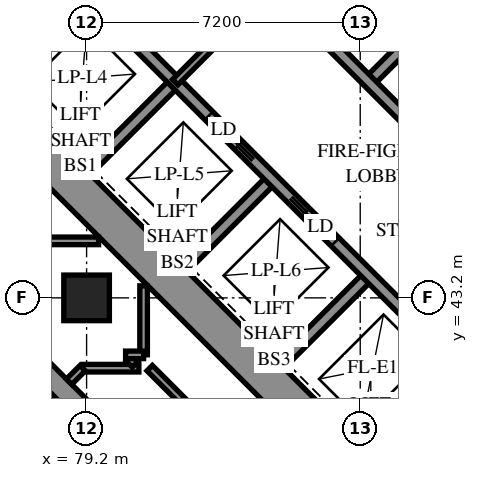
"""IFC4 building model, lengths in metres.
Left out: names, types, materials, properties, quantities, classifications, styles, units other than length and angle.
Written with IfcOpenShell. Run it as: python <this file> out.ifc"""

import sys

from ifc_helpers import new_model, si_unit, direction, frame, frame_2d, origin, origin_2d, place, context, subcontext, project, spatial, polyline, rectangle, outline, extrude, element, fill, save


model = new_model("IFC4")
c1 = context("Model", 3, precision=1e-05, world=origin(), true_north=direction((0.0, 1.0)))
c2 = subcontext(c1, "Body", "Model", "MODEL_VIEW")
j1 = project(units=[si_unit("LENGTHUNIT", "METRE"), si_unit("PLANEANGLEUNIT", "RADIAN")], contexts=[c1])
p1 = place(None, origin())
s1 = spatial("IfcSite", under=j1, at=p1, CompositionType="ELEMENT")
p2 = place(p1, origin())
s2 = spatial("IfcBuilding", under=s1, at=p2, CompositionType="ELEMENT")
p3 = place(p2, frame((0.0, 0.0, 18.6)))
s3 = spatial("IfcBuildingStorey", under=s2, at=p3, CompositionType="ELEMENT", Elevation=18.6)
p4 = place(p3, frame((79.2, 43.2, 0.0), z_axis=(0.0, 0.0, 1.0), x_axis=(1.0, 0.0, 0.0)))
e1 = element("IfcColumn", 1, at=p4, inside=s3, PredefinedType="COLUMN", context=c2, shape_type="SweptSolid", body=[
    extrude(rectangle(XDim=1.2, YDim=1.2, at=origin_2d()), origin(), (0.0, 0.0, 1.0), 3.8),
])
p5 = place(p3, frame((75.594, 49.443, -0.4), z_axis=(0.0, 0.0, 1.0), x_axis=(0.7071037324, -0.70710983, 0.0)))
e2 = element("IfcWall", 2, at=p5, inside=s3, PredefinedType="SHEAR", context=c2, shape_type="SweptSolid", body=[
    extrude(rectangle(XDim=16.4, YDim=1.0, at=frame_2d((8.2, 0.0))), origin(), (0.0, 0.0, 1.0), 3.5),
])
p6 = place(p3, frame((86.483, 60.333, -0.4), z_axis=(0.0, 0.0, 1.0), x_axis=(0.70710983, -0.7071037324, 0.0)))
e3 = element("IfcWall", 3, at=p6, inside=s3, PredefinedType="SHEAR", context=c2, shape_type="SweptSolid", body=[
    extrude(rectangle(XDim=16.4, YDim=1.0, at=frame_2d((8.2, 0.0))), origin(), (0.0, 0.0, 1.0), 3.5),
])
p7 = place(p6, frame((11.0, 0.0, 0.4)))
e4 = element("IfcOpeningElement", 4, at=p7, cuts=e3, PredefinedType="OPENING", context=c2, shape_type="SweptSolid", body=[
    extrude(rectangle(XDim=0.8, YDim=2.1, at=frame_2d((0.4, 1.05))), frame((0.0, 0.51, 0.0), z_axis=(0.0, -1.0, 0.0), x_axis=(1.0, 0.0, 0.0)), (0.0, 0.0, 1.0), 1.02),
])
p8 = place(p3, frame((76.301, 49.443, -0.4), z_axis=(0.0, 0.0, 1.0), x_axis=(0.7071067812, 0.7071067812, 0.0)))
e5 = element("IfcWall", 5, at=p8, inside=s3, PredefinedType="SHEAR", context=c2, shape_type="SweptSolid", body=[
    extrude(rectangle(XDim=14.4, YDim=1.0, at=frame_2d((7.2, 0.0))), origin(), (0.0, 0.0, 1.0), 3.5),
])
p9 = place(p8, frame((4.55, 0.0, 0.4)))
e6 = element("IfcOpeningElement", 6, at=p9, cuts=e5, PredefinedType="OPENING", context=c2, shape_type="SweptSolid", body=[
    extrude(rectangle(XDim=1.1, YDim=2.1, at=frame_2d((0.55, 1.05))), frame((0.0, 0.51, 0.0), z_axis=(0.0, -1.0, 0.0), x_axis=(1.0, 0.0, 0.0)), (0.0, 0.0, 1.0), 1.02),
])
p10 = place(p8, frame((11.35, 0.0, 0.4)))
e7 = element("IfcOpeningElement", 7, at=p10, cuts=e5, PredefinedType="OPENING", context=c2, shape_type="SweptSolid", body=[
    extrude(rectangle(XDim=1.1, YDim=2.1, at=frame_2d((0.55, 1.05))), frame((0.0, 0.51, 0.0), z_axis=(0.0, -1.0, 0.0), x_axis=(1.0, 0.0, 0.0)), (0.0, 0.0, 1.0), 1.02),
])
p11 = place(p3, frame((87.19, 38.554, -0.4), z_axis=(0.0, 0.0, 1.0), x_axis=(0.707103309, 0.7071102534, 0.0)))
e8 = element("IfcWall", 8, at=p11, inside=s3, PredefinedType="SHEAR", context=c2, shape_type="SweptSolid", body=[
    extrude(rectangle(XDim=14.4, YDim=1.0, at=frame_2d((7.2, 0.0))), origin(), (0.0, 0.0, 1.0), 3.5),
])
p12 = place(p11, frame((4.55, 0.0, 0.4)))
e9 = element("IfcOpeningElement", 9, at=p12, cuts=e8, PredefinedType="OPENING", context=c2, shape_type="SweptSolid", body=[
    extrude(rectangle(XDim=1.1, YDim=2.1, at=frame_2d((0.55, 1.05))), frame((0.0, 0.51, 0.0), z_axis=(0.0, -1.0, 0.0), x_axis=(1.0, 0.0, 0.0)), (0.0, 0.0, 1.0), 1.02),
])
p13 = place(p11, frame((11.35, 0.0, 0.4)))
e10 = element("IfcOpeningElement", 10, at=p13, cuts=e8, PredefinedType="OPENING", context=c2, shape_type="SweptSolid", body=[
    extrude(rectangle(XDim=1.1, YDim=2.1, at=frame_2d((0.55, 1.05))), frame((0.0, 0.51, 0.0), z_axis=(0.0, -1.0, 0.0), x_axis=(1.0, 0.0, 0.0)), (0.0, 0.0, 1.0), 1.02),
])
p14 = place(p3, frame((79.2, 46.544, 0.0), z_axis=(0.0, 0.0, 1.0), x_axis=(0.7071219326, 0.7070916295, 0.0)))
e11 = element("IfcWall", 11, at=p14, inside=s3, PredefinedType="SOLIDWALL", context=c2, shape_type="SweptSolid", body=[
    extrude(rectangle(XDim=3.3, YDim=0.3, at=frame_2d((1.65, 0.0))), origin(), (0.0, 0.0, 1.0), 3.8),
])
p15 = place(p3, frame((81.746, 43.999, 0.0), z_axis=(0.0, 0.0, 1.0), x_axis=(0.7071067812, 0.7071067812, 0.0)))
e12 = element("IfcWall", 12, at=p15, inside=s3, PredefinedType="SOLIDWALL", context=c2, shape_type="SweptSolid", body=[
    extrude(rectangle(XDim=3.3, YDim=0.3, at=frame_2d((1.65, 0.0))), origin(), (0.0, 0.0, 1.0), 3.8),
])
p16 = place(p3, frame((86.625, 48.878, 0.0), z_axis=(0.0, 0.0, 1.0), x_axis=(0.7071067812, 0.7071067812, 0.0)))
e13 = element("IfcWall", 13, at=p16, inside=s3, PredefinedType="SOLIDWALL", context=c2, shape_type="SweptSolid", body=[
    extrude(rectangle(XDim=3.3, YDim=0.3, at=frame_2d((1.65, 0.0))), origin(), (0.0, 0.0, 1.0), 3.8),
])
p17 = place(p3, frame((84.291, 41.453, 0.0), z_axis=(0.0, 0.0, 1.0), x_axis=(0.7071067812, 0.7071067812, 0.0)))
e14 = element("IfcWall", 14, at=p17, inside=s3, PredefinedType="SOLIDWALL", context=c2, shape_type="SweptSolid", body=[
    extrude(rectangle(XDim=3.3, YDim=0.3, at=frame_2d((1.65, 0.0))), origin(), (0.0, 0.0, 1.0), 3.8),
])
p18 = place(p3, frame((78.988, 51.423, 0.0), z_axis=(0.0, 0.0, 1.0), x_axis=(0.7071067812, -0.7071067812, 0.0)))
e15 = element("IfcWall", 15, at=p18, inside=s3, PredefinedType="SOLIDWALL", context=c2, shape_type="SweptSolid", body=[
    extrude(rectangle(XDim=14.4, YDim=0.3, at=frame_2d((7.2, 0.0))), origin(), (0.0, 0.0, 1.0), 3.8),
])
p19 = place(p18, frame((1.25, 0.0, 0.0)))
e16 = element("IfcOpeningElement", 16, at=p19, cuts=e15, PredefinedType="OPENING", context=c2, shape_type="SweptSolid", body=[
    extrude(rectangle(XDim=1.1, YDim=2.1, at=frame_2d((0.55, 1.05))), frame((0.0, 0.16, 0.0), z_axis=(0.0, -1.0, 0.0), x_axis=(1.0, 0.0, 0.0)), (0.0, 0.0, 1.0), 0.32),
])
p20 = place(p18, frame((4.85, 0.0, 0.0)))
e17 = element("IfcOpeningElement", 17, at=p20, cuts=e15, PredefinedType="OPENING", context=c2, shape_type="SweptSolid", body=[
    extrude(rectangle(XDim=1.1, YDim=2.1, at=frame_2d((0.55, 1.05))), frame((0.0, 0.16, 0.0), z_axis=(0.0, -1.0, 0.0), x_axis=(1.0, 0.0, 0.0)), (0.0, 0.0, 1.0), 0.32),
])
p21 = place(p18, frame((8.45, 0.0, 0.0)))
e18 = element("IfcOpeningElement", 18, at=p21, cuts=e15, PredefinedType="OPENING", context=c2, shape_type="SweptSolid", body=[
    extrude(rectangle(XDim=1.1, YDim=2.1, at=frame_2d((0.55, 1.05))), frame((0.0, 0.16, 0.0), z_axis=(0.0, -1.0, 0.0), x_axis=(1.0, 0.0, 0.0)), (0.0, 0.0, 1.0), 0.32),
])
p22 = place(p18, frame((12.05, 0.0, 0.0)))
e19 = element("IfcOpeningElement", 19, at=p22, cuts=e15, PredefinedType="OPENING", context=c2, shape_type="SweptSolid", body=[
    extrude(rectangle(XDim=1.1, YDim=2.1, at=frame_2d((0.55, 1.05))), frame((0.0, 0.16, 0.0), z_axis=(0.0, -1.0, 0.0), x_axis=(1.0, 0.0, 0.0)), (0.0, 0.0, 1.0), 0.32),
])
p23 = place(p3, frame((81.534, 53.969, 0.0), z_axis=(0.0, 0.0, 1.0), x_axis=(0.707103309, -0.7071102534, 0.0)))
e20 = element("IfcWall", 20, at=p23, inside=s3, PredefinedType="SOLIDWALL", context=c2, shape_type="SweptSolid", body=[
    extrude(rectangle(XDim=14.4, YDim=0.3, at=frame_2d((7.2, 0.0))), origin(), (0.0, 0.0, 1.0), 3.8),
])
p24 = place(p23, frame((12.05, 0.0, 0.0)))
e21 = element("IfcOpeningElement", 21, at=p24, cuts=e20, PredefinedType="OPENING", context=c2, shape_type="SweptSolid", body=[
    extrude(rectangle(XDim=1.1, YDim=2.1, at=frame_2d((0.55, 1.05))), frame((0.0, 0.16, 0.0), z_axis=(0.0, -1.0, 0.0), x_axis=(1.0, 0.0, 0.0)), (0.0, 0.0, 1.0), 0.32),
])
p25 = place(p3, frame((117.843, 34.665, 0.0), z_axis=(0.0, 0.0, 1.0), x_axis=(-0.7071067812, 0.7071067812, 0.0)))
e22 = element("IfcWall", 22, at=p25, inside=s3, PredefinedType="SOLIDWALL", context=c2, shape_type="SweptSolid", body=[
    extrude(outline(polyline([(-0.275, -0.275), (54.222, -0.275), (53.994, 0.275), (0.275, 0.275), (-0.275, -0.275)])), origin(), (0.0, 0.0, 1.0), 3.8),
])
p26 = place(p25, frame((0.8, 0.0, 0.7)))
e23 = element("IfcOpeningElement", 23, at=p26, cuts=e22, PredefinedType="OPENING", context=c2, shape_type="SweptSolid", body=[
    extrude(rectangle(XDim=1.8, YDim=2.4, at=frame_2d((0.9, 1.2))), frame((0.0, 0.285, 0.0), z_axis=(0.0, -1.0, 0.0), x_axis=(1.0, 0.0, 0.0)), (0.0, 0.0, 1.0), 0.57),
])
p27 = place(p25, frame((4.225, 0.0, 0.7)))
e24 = element("IfcOpeningElement", 24, at=p27, cuts=e22, PredefinedType="OPENING", context=c2, shape_type="SweptSolid", body=[
    extrude(rectangle(XDim=1.8, YDim=2.4, at=frame_2d((0.9, 1.2))), frame((0.0, 0.285, 0.0), z_axis=(0.0, -1.0, 0.0), x_axis=(1.0, 0.0, 0.0)), (0.0, 0.0, 1.0), 0.57),
])
p28 = place(p25, frame((7.825, 0.0, 0.7)))
e25 = element("IfcOpeningElement", 25, at=p28, cuts=e22, PredefinedType="OPENING", context=c2, shape_type="SweptSolid", body=[
    extrude(rectangle(XDim=1.8, YDim=2.4, at=frame_2d((0.9, 1.2))), frame((0.0, 0.285, 0.0), z_axis=(0.0, -1.0, 0.0), x_axis=(1.0, 0.0, 0.0)), (0.0, 0.0, 1.0), 0.57),
])
p29 = place(p25, frame((11.425, 0.0, 0.7)))
e26 = element("IfcOpeningElement", 26, at=p29, cuts=e22, PredefinedType="OPENING", context=c2, shape_type="SweptSolid", body=[
    extrude(rectangle(XDim=1.8, YDim=2.4, at=frame_2d((0.9, 1.2))), frame((0.0, 0.285, 0.0), z_axis=(0.0, -1.0, 0.0), x_axis=(1.0, 0.0, 0.0)), (0.0, 0.0, 1.0), 0.57),
])
p30 = place(p25, frame((15.025, 0.0, 0.7)))
e27 = element("IfcOpeningElement", 27, at=p30, cuts=e22, PredefinedType="OPENING", context=c2, shape_type="SweptSolid", body=[
    extrude(rectangle(XDim=1.8, YDim=2.4, at=frame_2d((0.9, 1.2))), frame((0.0, 0.285, 0.0), z_axis=(0.0, -1.0, 0.0), x_axis=(1.0, 0.0, 0.0)), (0.0, 0.0, 1.0), 0.57),
])
p31 = place(p25, frame((18.625, 0.0, 0.7)))
e28 = element("IfcOpeningElement", 28, at=p31, cuts=e22, PredefinedType="OPENING", context=c2, shape_type="SweptSolid", body=[
    extrude(rectangle(XDim=1.8, YDim=2.4, at=frame_2d((0.9, 1.2))), frame((0.0, 0.285, 0.0), z_axis=(0.0, -1.0, 0.0), x_axis=(1.0, 0.0, 0.0)), (0.0, 0.0, 1.0), 0.57),
])
p32 = place(p25, frame((22.225, 0.0, 0.7)))
e29 = element("IfcOpeningElement", 29, at=p32, cuts=e22, PredefinedType="OPENING", context=c2, shape_type="SweptSolid", body=[
    extrude(rectangle(XDim=1.8, YDim=2.4, at=frame_2d((0.9, 1.2))), frame((0.0, 0.285, 0.0), z_axis=(0.0, -1.0, 0.0), x_axis=(1.0, 0.0, 0.0)), (0.0, 0.0, 1.0), 0.57),
])
p33 = place(p25, frame((25.825, 0.0, 0.7)))
e30 = element("IfcOpeningElement", 30, at=p33, cuts=e22, PredefinedType="OPENING", context=c2, shape_type="SweptSolid", body=[
    extrude(rectangle(XDim=1.8, YDim=2.4, at=frame_2d((0.9, 1.2))), frame((0.0, 0.285, 0.0), z_axis=(0.0, -1.0, 0.0), x_axis=(1.0, 0.0, 0.0)), (0.0, 0.0, 1.0), 0.57),
])
p34 = place(p25, frame((29.425, 0.0, 0.7)))
e31 = element("IfcOpeningElement", 31, at=p34, cuts=e22, PredefinedType="OPENING", context=c2, shape_type="SweptSolid", body=[
    extrude(rectangle(XDim=1.8, YDim=2.4, at=frame_2d((0.9, 1.2))), frame((0.0, 0.285, 0.0), z_axis=(0.0, -1.0, 0.0), x_axis=(1.0, 0.0, 0.0)), (0.0, 0.0, 1.0), 0.57),
])
p35 = place(p25, frame((33.025, 0.0, 0.7)))
e32 = element("IfcOpeningElement", 32, at=p35, cuts=e22, PredefinedType="OPENING", context=c2, shape_type="SweptSolid", body=[
    extrude(rectangle(XDim=1.8, YDim=2.4, at=frame_2d((0.9, 1.2))), frame((0.0, 0.285, 0.0), z_axis=(0.0, -1.0, 0.0), x_axis=(1.0, 0.0, 0.0)), (0.0, 0.0, 1.0), 0.57),
])
p36 = place(p25, frame((36.625, 0.0, 0.7)))
e33 = element("IfcOpeningElement", 33, at=p36, cuts=e22, PredefinedType="OPENING", context=c2, shape_type="SweptSolid", body=[
    extrude(rectangle(XDim=1.8, YDim=2.4, at=frame_2d((0.9, 1.2))), frame((0.0, 0.285, 0.0), z_axis=(0.0, -1.0, 0.0), x_axis=(1.0, 0.0, 0.0)), (0.0, 0.0, 1.0), 0.57),
])
p37 = place(p25, frame((40.225, 0.0, 0.7)))
e34 = element("IfcOpeningElement", 34, at=p37, cuts=e22, PredefinedType="OPENING", context=c2, shape_type="SweptSolid", body=[
    extrude(rectangle(XDim=1.8, YDim=2.4, at=frame_2d((0.9, 1.2))), frame((0.0, 0.285, 0.0), z_axis=(0.0, -1.0, 0.0), x_axis=(1.0, 0.0, 0.0)), (0.0, 0.0, 1.0), 0.57),
])
p38 = place(p25, frame((43.825, 0.0, 0.7)))
e35 = element("IfcOpeningElement", 35, at=p38, cuts=e22, PredefinedType="OPENING", context=c2, shape_type="SweptSolid", body=[
    extrude(rectangle(XDim=1.8, YDim=2.4, at=frame_2d((0.9, 1.2))), frame((0.0, 0.285, 0.0), z_axis=(0.0, -1.0, 0.0), x_axis=(1.0, 0.0, 0.0)), (0.0, 0.0, 1.0), 0.57),
])
p39 = place(p25, frame((47.425, 0.0, 0.7)))
e36 = element("IfcOpeningElement", 36, at=p39, cuts=e22, PredefinedType="OPENING", context=c2, shape_type="SweptSolid", body=[
    extrude(rectangle(XDim=1.8, YDim=2.4, at=frame_2d((0.9, 1.2))), frame((0.0, 0.285, 0.0), z_axis=(0.0, -1.0, 0.0), x_axis=(1.0, 0.0, 0.0)), (0.0, 0.0, 1.0), 0.57),
])
p40 = place(p25, frame((51.06, 0.0, 0.7)))
e37 = element("IfcOpeningElement", 37, at=p40, cuts=e22, PredefinedType="OPENING", context=c2, shape_type="SweptSolid", body=[
    extrude(rectangle(XDim=1.8, YDim=2.4, at=frame_2d((0.9, 1.2))), frame((0.0, 0.285, 0.0), z_axis=(0.0, -1.0, 0.0), x_axis=(1.0, 0.0, 0.0)), (0.0, 0.0, 1.0), 0.57),
])
p41 = place(p3, frame((77.07, 42.275, 0.0), z_axis=(0.0, 0.0, 1.0), x_axis=(0.7071067812, -0.7071067812, 0.0)))
e38 = element("IfcWall", 38, at=p41, inside=s3, PredefinedType="SOLIDWALL", context=c2, shape_type="SweptSolid", body=[
    extrude(outline(polyline([(0.114, -0.275), (39.288, -0.275), (38.737, 0.275), (-0.114, 0.275), (0.114, -0.275)])), origin(), (0.0, 0.0, 1.0), 3.8),
])
p42 = place(p41, frame((2.837, 0.0, 0.7)))
e39 = element("IfcOpeningElement", 39, at=p42, cuts=e38, PredefinedType="OPENING", context=c2, shape_type="SweptSolid", body=[
    extrude(rectangle(XDim=1.8, YDim=2.4, at=frame_2d((0.9, 1.2))), frame((0.0, 0.285, 0.0), z_axis=(0.0, -1.0, 0.0), x_axis=(1.0, 0.0, 0.0)), (0.0, 0.0, 1.0), 0.57),
])
p43 = place(p41, frame((6.588, 0.0, 0.7)))
e40 = element("IfcOpeningElement", 40, at=p43, cuts=e38, PredefinedType="OPENING", context=c2, shape_type="SweptSolid", body=[
    extrude(rectangle(XDim=1.8, YDim=2.4, at=frame_2d((0.9, 1.2))), frame((0.0, 0.285, 0.0), z_axis=(0.0, -1.0, 0.0), x_axis=(1.0, 0.0, 0.0)), (0.0, 0.0, 1.0), 0.57),
])
p44 = place(p41, frame((10.188, 0.0, 0.7)))
e41 = element("IfcOpeningElement", 41, at=p44, cuts=e38, PredefinedType="OPENING", context=c2, shape_type="SweptSolid", body=[
    extrude(rectangle(XDim=1.8, YDim=2.4, at=frame_2d((0.9, 1.2))), frame((0.0, 0.285, 0.0), z_axis=(0.0, -1.0, 0.0), x_axis=(1.0, 0.0, 0.0)), (0.0, 0.0, 1.0), 0.57),
])
p45 = place(p41, frame((13.787, 0.0, 0.7)))
e42 = element("IfcOpeningElement", 42, at=p45, cuts=e38, PredefinedType="OPENING", context=c2, shape_type="SweptSolid", body=[
    extrude(rectangle(XDim=1.8, YDim=2.4, at=frame_2d((0.9, 1.2))), frame((0.0, 0.285, 0.0), z_axis=(0.0, -1.0, 0.0), x_axis=(1.0, 0.0, 0.0)), (0.0, 0.0, 1.0), 0.57),
])
p46 = place(p41, frame((17.387, 0.0, 0.7)))
e43 = element("IfcOpeningElement", 43, at=p46, cuts=e38, PredefinedType="OPENING", context=c2, shape_type="SweptSolid", body=[
    extrude(rectangle(XDim=1.8, YDim=2.4, at=frame_2d((0.9, 1.2))), frame((0.0, 0.285, 0.0), z_axis=(0.0, -1.0, 0.0), x_axis=(1.0, 0.0, 0.0)), (0.0, 0.0, 1.0), 0.57),
])
p47 = place(p41, frame((20.988, 0.0, 0.7)))
e44 = element("IfcOpeningElement", 44, at=p47, cuts=e38, PredefinedType="OPENING", context=c2, shape_type="SweptSolid", body=[
    extrude(rectangle(XDim=1.8, YDim=2.4, at=frame_2d((0.9, 1.2))), frame((0.0, 0.285, 0.0), z_axis=(0.0, -1.0, 0.0), x_axis=(1.0, 0.0, 0.0)), (0.0, 0.0, 1.0), 0.57),
])
p48 = place(p41, frame((24.587, 0.0, 0.7)))
e45 = element("IfcOpeningElement", 45, at=p48, cuts=e38, PredefinedType="OPENING", context=c2, shape_type="SweptSolid", body=[
    extrude(rectangle(XDim=1.8, YDim=2.4, at=frame_2d((0.9, 1.2))), frame((0.0, 0.285, 0.0), z_axis=(0.0, -1.0, 0.0), x_axis=(1.0, 0.0, 0.0)), (0.0, 0.0, 1.0), 0.57),
])
p49 = place(p41, frame((28.188, 0.0, 0.7)))
e46 = element("IfcOpeningElement", 46, at=p49, cuts=e38, PredefinedType="OPENING", context=c2, shape_type="SweptSolid", body=[
    extrude(rectangle(XDim=1.8, YDim=2.4, at=frame_2d((0.9, 1.2))), frame((0.0, 0.285, 0.0), z_axis=(0.0, -1.0, 0.0), x_axis=(1.0, 0.0, 0.0)), (0.0, 0.0, 1.0), 0.57),
])
p50 = place(p41, frame((31.788, 0.0, 0.7)))
e47 = element("IfcOpeningElement", 47, at=p50, cuts=e38, PredefinedType="OPENING", context=c2, shape_type="SweptSolid", body=[
    extrude(rectangle(XDim=1.8, YDim=2.4, at=frame_2d((0.9, 1.2))), frame((0.0, 0.285, 0.0), z_axis=(0.0, -1.0, 0.0), x_axis=(1.0, 0.0, 0.0)), (0.0, 0.0, 1.0), 0.57),
])
p51 = place(p41, frame((35.388, 0.0, 0.7)))
e48 = element("IfcOpeningElement", 48, at=p51, cuts=e38, PredefinedType="OPENING", context=c2, shape_type="SweptSolid", body=[
    extrude(rectangle(XDim=1.8, YDim=2.4, at=frame_2d((0.9, 1.2))), frame((0.0, 0.285, 0.0), z_axis=(0.0, -1.0, 0.0), x_axis=(1.0, 0.0, 0.0)), (0.0, 0.0, 1.0), 0.57),
])
p52 = place(p3, frame((81.534, 48.878, 0.0), z_axis=(0.0, 0.0, 1.0), x_axis=(0.707092892, 0.7071206701, 0.0)))
e49 = element("IfcWall", 49, at=p52, inside=s3, PredefinedType="PARTITIONING", context=c2, shape_type="SweptSolid", body=[
    extrude(rectangle(XDim=3.6, YDim=0.2, at=frame_2d((1.8, 0.0))), origin(), (0.0, 0.0, 1.0), 3.8),
])
p53 = place(p3, frame((86.376, 33.357, 0.0), z_axis=(0.0, 0.0, 1.0), x_axis=(0.7071021083, 0.707111454, 0.0)))
e50 = element("IfcWall", 50, at=p53, inside=s3, PredefinedType="PARTITIONING", context=c2, shape_type="SweptSolid", body=[
    extrude(rectangle(XDim=10.7, YDim=0.2, at=frame_2d((5.35, 0.0))), origin(), (0.0, 0.0, 1.0), 3.8),
])
p54 = place(p3, frame((86.836, 35.372, 0.0), z_axis=(0.0, 0.0, 1.0), x_axis=(0.7071067812, 0.7071067812, 0.0)))
e51 = element("IfcWall", 51, at=p54, inside=s3, PredefinedType="PARTITIONING", context=c2, shape_type="SweptSolid", body=[
    extrude(rectangle(XDim=8.949, YDim=0.2, at=frame_2d((4.474, 0.0))), origin(), (0.0, 0.0, 1.0), 3.8),
])
p55 = place(p54, frame((7.8, 0.0, 0.0)))
e52 = element("IfcOpeningElement", 52, at=p55, cuts=e51, PredefinedType="OPENING", context=c2, shape_type="SweptSolid", body=[
    extrude(rectangle(XDim=1.0, YDim=2.1, at=frame_2d((0.5, 1.05))), frame((0.0, 0.11, 0.0), z_axis=(0.0, -1.0, 0.0), x_axis=(1.0, 0.0, 0.0)), (0.0, 0.0, 1.0), 0.22),
])
p56 = place(p3, frame((85.07, 37.142, 0.0), z_axis=(0.0, 0.0, 1.0), x_axis=(-0.7070899851, 0.7071235769, 0.0)))
e53 = element("IfcWall", 53, at=p56, inside=s3, PredefinedType="PARTITIONING", context=c2, shape_type="SweptSolid", body=[
    extrude(rectangle(XDim=5.954, YDim=0.2, at=frame_2d((2.977, 0.0))), origin(), (0.0, 0.0, 1.0), 3.8),
])
p57 = place(p56, frame((2.326, 0.0, 0.0)))
e54 = element("IfcOpeningElement", 54, at=p57, cuts=e53, PredefinedType="OPENING", context=c2, shape_type="SweptSolid", body=[
    extrude(rectangle(XDim=1.0, YDim=2.1, at=frame_2d((0.5, 1.05))), frame((0.0, 0.11, 0.0), z_axis=(0.0, -1.0, 0.0), x_axis=(1.0, 0.0, 0.0)), (0.0, 0.0, 1.0), 0.22),
])
for number, where, z_axis, x_axis in (
    (55, (77.702, 44.7, 0.0), (0.0, 0.0, 1.0), (1.0, 0.0, 0.0)),
    (56, (80.7, 41.702, 0.0), (0.0, 0.0, 1.0), (0.0, 1.0, 0.0)),
):
    element("IfcWall", number, at=place(p3, frame(where, z_axis=z_axis, x_axis=x_axis)), inside=s3, PredefinedType="PARTITIONING", context=c2, shape_type="SweptSolid", body=[
        extrude(rectangle(XDim=1.814, YDim=0.2, at=frame_2d((0.907, 0.0))), origin(), (0.0, 0.0, 1.0), 3.8),
    ])
p58 = place(p3, frame((79.098, 41.35, 0.0), z_axis=(0.0, 0.0, 1.0), x_axis=(1.0, 0.0, 0.0)))
e57 = element("IfcWall", 57, at=p58, inside=s3, PredefinedType="PARTITIONING", context=c2, shape_type="SweptSolid", body=[
    extrude(rectangle(XDim=1.478, YDim=0.2, at=frame_2d((0.739, 0.0))), origin(), (0.0, 0.0, 1.0), 3.8),
])
p59 = place(p3, frame((80.315, 41.605, 0.0), z_axis=(0.0, 0.0, 1.0), x_axis=(0.7071067812, -0.7071067812, 0.0)))
e58 = element("IfcWall", 58, at=p59, inside=s3, PredefinedType="PARTITIONING", context=c2, shape_type="SweptSolid", body=[
    extrude(rectangle(XDim=0.225, YDim=0.2, at=frame_2d((0.113, 0.0))), origin(), (0.0, 0.0, 1.0), 3.8),
])
p60 = place(p3, frame((80.226, 41.7, 0.0), z_axis=(0.0, 0.0, 1.0), x_axis=(1.0, 0.0, 0.0)))
e59 = element("IfcWall", 59, at=p60, inside=s3, PredefinedType="PARTITIONING", context=c2, shape_type="SweptSolid", body=[
    extrude(rectangle(XDim=0.474, YDim=0.2, at=frame_2d((0.237, 0.0))), origin(), (0.0, 0.0, 1.0), 3.8),
])
p61 = place(p3, frame((78.74, 40.994, 0.0), z_axis=(0.0, 0.0, 1.0), x_axis=(0.7072060451, 0.7070075033, 0.0)))
e60 = element("IfcWall", 60, at=p61, inside=s3, PredefinedType="PARTITIONING", context=c2, shape_type="SweptSolid", body=[
    extrude(rectangle(XDim=0.504, YDim=0.2, at=frame_2d((0.252, 0.0))), origin(), (0.0, 0.0, 1.0), 3.8),
])
p62 = place(p20, origin())
e61 = element("IfcDoor", 61, at=p62, inside=s3, OperationType="SLIDING_TO_RIGHT", PredefinedType="DOOR", context=c2, shape_type="SweptSolid", body=[
    extrude(rectangle(XDim=1.1, YDim=2.1, at=frame_2d((0.55, 1.05))), frame((0.0, 0.025, 0.0), z_axis=(0.0, -1.0, 0.0), x_axis=(1.0, 0.0, 0.0)), (0.0, 0.0, 1.0), 0.05),
])
fill(e17, e61)
p63 = place(p21, origin())
e62 = element("IfcDoor", 62, at=p63, inside=s3, OperationType="SLIDING_TO_LEFT", PredefinedType="DOOR", context=c2, shape_type="SweptSolid", body=[
    extrude(rectangle(XDim=1.1, YDim=2.1, at=frame_2d((0.55, 1.05))), frame((0.0, 0.025, 0.0), z_axis=(0.0, -1.0, 0.0), x_axis=(1.0, 0.0, 0.0)), (0.0, 0.0, 1.0), 0.05),
])
fill(e18, e62)
save(model, sys.argv[1])
